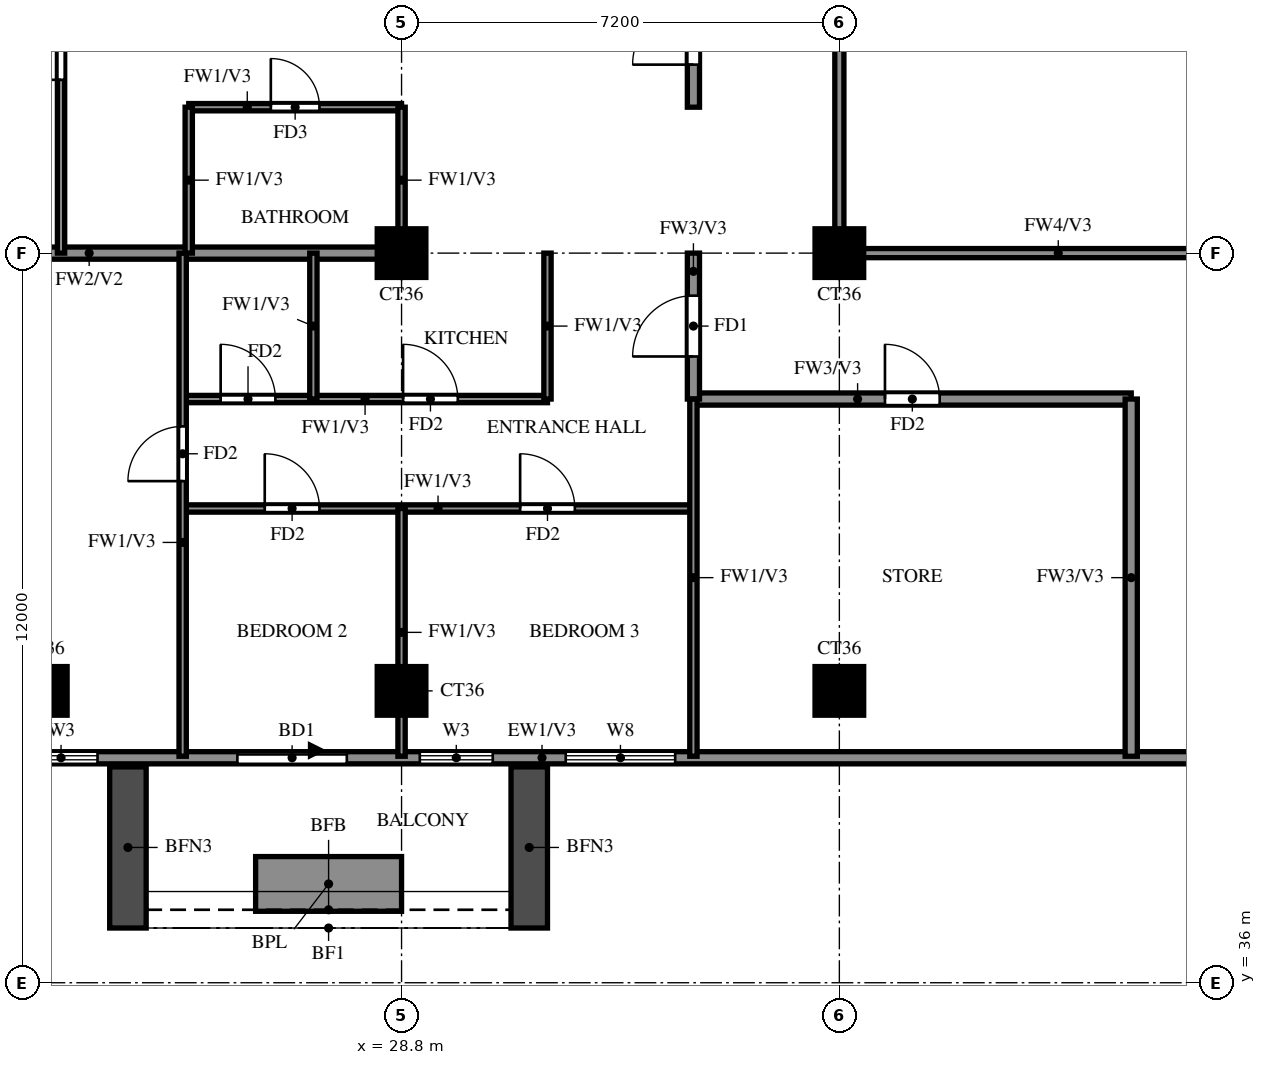
"""IFC4 building model, lengths in metres.
Left out: names, types, materials, properties, quantities, classifications, styles, units other than length and angle.
Written with IfcOpenShell. Run it as: python <this file> out.ifc"""

import sys

from ifc_helpers import new_model, si_unit, direction, frame, frame_2d, origin, origin_2d, place, context, subcontext, project, spatial, rectangle, extrude, source, transform, mapped, element, fill, save


model = new_model("IFC4")
c1 = context("Model", 3, precision=1e-05, world=origin(), true_north=direction((0.0, 1.0)))
c2 = subcontext(c1, "Body", "Model", "MODEL_VIEW")
j1 = project(units=[si_unit("LENGTHUNIT", "METRE"), si_unit("PLANEANGLEUNIT", "RADIAN")], contexts=[c1])
p1 = place(None, origin())
s1 = spatial("IfcSite", under=j1, at=p1, CompositionType="ELEMENT")
p2 = place(p1, origin())
s2 = spatial("IfcBuilding", under=s1, at=p2, CompositionType="ELEMENT")
p3 = place(p2, frame((0.0, 0.0, 236.0)))
s3 = spatial("IfcBuildingStorey", under=s2, at=p3, CompositionType="ELEMENT", Elevation=236.0)
m1 = source(origin(), c2, "Body", "SweptSolid", [
    extrude(rectangle(XDim=0.8, YDim=0.8, at=origin_2d()), origin(), (0.0, 0.0, 1.0), 3.22),
])
for number, where, z_axis, x_axis in (
    (1, (22.9, 40.8, 0.0), (0.0, 0.0, 1.0), (1.0, 0.0, 0.0)),
    (2, (28.8, 40.8, 0.0), (0.0, 0.0, 1.0), (1.0, 0.0, 0.0)),
    (3, (36.0, 40.8, 0.0), (0.0, 0.0, 1.0), (1.0, 0.0, 0.0)),
    (4, (28.8, 48.0, 0.0), (0.0, 0.0, 1.0), (1.0, 0.0, 0.0)),
    (5, (36.0, 48.0, 0.0), (0.0, 0.0, 1.0), (1.0, 0.0, 0.0)),
):
    element("IfcColumn", number, at=place(p3, frame(where, z_axis=z_axis, x_axis=x_axis)), inside=s3, PredefinedType="COLUMN", context=c2, shape_type="MappedRepresentation", body=[
        mapped(m1, transform((0.0, 0.0, 0.0))),
    ])
p4 = place(p3, frame((22.2, 39.7, 0.0), z_axis=(0.0, 0.0, 1.0), x_axis=(1.0, 0.0, 0.0)))
e6 = element("IfcWall", 6, at=p4, inside=s3, PredefinedType="SOLIDWALL", context=c2, shape_type="SweptSolid", body=[
    extrude(rectangle(XDim=19.8, YDim=0.2, at=frame_2d((9.9, 0.0))), origin(), (0.0, 0.0, 1.0), 3.22),
])
p5 = place(p4, frame((3.9, 0.0, 0.0)))
e7 = element("IfcOpeningElement", 7, at=p5, cuts=e6, PredefinedType="OPENING", context=c2, shape_type="SweptSolid", body=[
    extrude(rectangle(XDim=1.8, YDim=2.4, at=frame_2d((0.9, 1.2))), frame((0.0, 0.11, 0.0), z_axis=(0.0, -1.0, 0.0), x_axis=(1.0, 0.0, 0.0)), (0.0, 0.0, 1.0), 0.22),
])
p6 = place(p4, frame((0.4, 0.0, 0.6)))
e8 = element("IfcOpeningElement", 8, at=p6, cuts=e6, PredefinedType="OPENING", context=c2, shape_type="SweptSolid", body=[
    extrude(rectangle(XDim=1.2, YDim=2.4, at=frame_2d((0.6, 1.2))), frame((0.0, 0.11, 0.0), z_axis=(0.0, -1.0, 0.0), x_axis=(1.0, 0.0, 0.0)), (0.0, 0.0, 1.0), 0.22),
])
p7 = place(p4, frame((6.9, 0.0, 0.6)))
e9 = element("IfcOpeningElement", 9, at=p7, cuts=e6, PredefinedType="OPENING", context=c2, shape_type="SweptSolid", body=[
    extrude(rectangle(XDim=1.2, YDim=2.4, at=frame_2d((0.6, 1.2))), frame((0.0, 0.11, 0.0), z_axis=(0.0, -1.0, 0.0), x_axis=(1.0, 0.0, 0.0)), (0.0, 0.0, 1.0), 0.22),
])
p8 = place(p4, frame((9.3, 0.0, 0.6)))
e10 = element("IfcOpeningElement", 10, at=p8, cuts=e6, PredefinedType="OPENING", context=c2, shape_type="SweptSolid", body=[
    extrude(rectangle(XDim=1.8, YDim=2.4, at=frame_2d((0.9, 1.2))), frame((0.0, 0.11, 0.0), z_axis=(0.0, -1.0, 0.0), x_axis=(1.0, 0.0, 0.0)), (0.0, 0.0, 1.0), 0.22),
])
for number, where, z_axis, x_axis in (
    (11, (24.3, 39.55, 0.0), (0.0, 0.0, 1.0), (0.0, -1.0, 0.0)),
    (12, (30.9, 39.55, 0.0), (0.0, 0.0, 1.0), (0.0, -1.0, 0.0)),
):
    element("IfcWall", number, at=place(p3, frame(where, z_axis=z_axis, x_axis=x_axis)), inside=s3, PredefinedType="SOLIDWALL", context=c2, shape_type="SweptSolid", body=[
        extrude(rectangle(XDim=2.65, YDim=0.6, at=frame_2d((1.325, 0.0))), origin(), (0.0, 0.0, 1.0), 2.85),
    ])
p9 = place(p3, frame((26.4, 37.625, 0.0), z_axis=(0.0, 0.0, 1.0), x_axis=(1.0, 0.0, 0.0)))
e13 = element("IfcWall", 13, at=p9, inside=s3, PredefinedType="SOLIDWALL", context=c2, shape_type="SweptSolid", body=[
    extrude(rectangle(XDim=2.4, YDim=0.9, at=frame_2d((1.2, 0.0))), origin(), (0.0, 0.0, 1.0), 0.9),
])
p10 = place(p3, frame((33.6, 45.6, 0.0), z_axis=(0.0, 0.0, 1.0), x_axis=(1.0, 0.0, 0.0)))
e14 = element("IfcWall", 14, at=p10, inside=s3, PredefinedType="SOLIDWALL", context=c2, shape_type="SweptSolid", body=[
    extrude(rectangle(XDim=7.2, YDim=0.2, at=frame_2d((3.6, 0.0))), origin(), (0.0, 0.0, 1.0), 3.22),
])
p11 = place(p10, frame((3.15, 0.0, 0.0)))
e15 = element("IfcOpeningElement", 15, at=p11, cuts=e14, PredefinedType="OPENING", context=c2, shape_type="SweptSolid", body=[
    extrude(rectangle(XDim=0.9, YDim=2.1, at=frame_2d((0.45, 1.05))), frame((0.0, 0.11, 0.0), z_axis=(0.0, -1.0, 0.0), x_axis=(1.0, 0.0, 0.0)), (0.0, 0.0, 1.0), 0.22),
])
p12 = place(p3, frame((33.6, 45.6, 0.0), z_axis=(0.0, 0.0, 1.0), x_axis=(0.0, 1.0, 0.0)))
e16 = element("IfcWall", 16, at=p12, inside=s3, PredefinedType="SOLIDWALL", context=c2, shape_type="SweptSolid", body=[
    extrude(rectangle(XDim=2.4, YDim=0.2, at=frame_2d((1.2, 0.0))), origin(), (0.0, 0.0, 1.0), 3.22),
])
p13 = place(p12, frame((0.7, 0.0, 0.0)))
e17 = element("IfcOpeningElement", 17, at=p13, cuts=e16, PredefinedType="OPENING", context=c2, shape_type="SweptSolid", body=[
    extrude(rectangle(XDim=1.0, YDim=2.1, at=frame_2d((0.5, 1.05))), frame((0.0, 0.11, 0.0), z_axis=(0.0, -1.0, 0.0), x_axis=(1.0, 0.0, 0.0)), (0.0, 0.0, 1.0), 0.22),
])
p14 = place(p3, frame((33.6, 50.4, 0.0), z_axis=(0.0, 0.0, 1.0), x_axis=(0.0, 1.0, 0.0)))
e18 = element("IfcWall", 18, at=p14, inside=s3, PredefinedType="SOLIDWALL", context=c2, shape_type="SweptSolid", body=[
    extrude(rectangle(XDim=12.0, YDim=0.2, at=frame_2d((6.0, 0.0))), origin(), (0.0, 0.0, 1.0), 3.22),
])
p15 = place(p14, frame((0.7, 0.0, 0.0)))
e19 = element("IfcOpeningElement", 19, at=p15, cuts=e18, PredefinedType="OPENING", context=c2, shape_type="SweptSolid", body=[
    extrude(rectangle(XDim=1.0, YDim=2.1, at=frame_2d((0.5, 1.05))), frame((0.0, 0.11, 0.0), z_axis=(0.0, -1.0, 0.0), x_axis=(1.0, 0.0, 0.0)), (0.0, 0.0, 1.0), 0.22),
])
p16 = place(p14, frame((9.7, 0.0, 0.0)))
e20 = element("IfcOpeningElement", 20, at=p16, cuts=e18, PredefinedType="OPENING", context=c2, shape_type="SweptSolid", body=[
    extrude(rectangle(XDim=1.0, YDim=2.1, at=frame_2d((0.5, 1.05))), frame((0.0, 0.11, 0.0), z_axis=(0.0, -1.0, 0.0), x_axis=(1.0, 0.0, 0.0)), (0.0, 0.0, 1.0), 0.22),
])
p17 = place(p3, frame((40.8, 39.725, 0.0), z_axis=(0.0, 0.0, 1.0), x_axis=(0.0, 1.0, 0.0)))
e21 = element("IfcWall", 21, at=p17, inside=s3, PredefinedType="SOLIDWALL", context=c2, shape_type="SweptSolid", body=[
    extrude(rectangle(XDim=5.875, YDim=0.2, at=frame_2d((2.938, 0.0))), origin(), (0.0, 0.0, 1.0), 3.22),
])
p18 = place(p3, frame((18.525, 48.0, 0.0), z_axis=(0.0, 0.0, 1.0), x_axis=(1.0, 0.0, 0.0)))
e22 = element("IfcWall", 22, at=p18, inside=s3, PredefinedType="SOLIDWALL", context=c2, shape_type="SweptSolid", body=[
    extrude(rectangle(XDim=10.275, YDim=0.2, at=frame_2d((5.138, 0.0))), origin(), (0.0, 0.0, 1.0), 3.22),
])
p19 = place(p3, frame((25.2, 43.8, 0.0), z_axis=(0.0, 0.0, 1.0), x_axis=(1.0, 0.0, 0.0)))
e23 = element("IfcWall", 23, at=p19, inside=s3, PredefinedType="PARTITIONING", context=c2, shape_type="SweptSolid", body=[
    extrude(rectangle(XDim=8.4, YDim=0.12, at=frame_2d((4.2, 0.0))), origin(), (0.0, 0.0, 1.0), 3.22),
])
p20 = place(p19, frame((1.35, 0.0, 0.0)))
e24 = element("IfcOpeningElement", 24, at=p20, cuts=e23, PredefinedType="OPENING", context=c2, shape_type="SweptSolid", body=[
    extrude(rectangle(XDim=0.9, YDim=2.1, at=frame_2d((0.45, 1.05))), frame((0.0, 0.07, 0.0), z_axis=(0.0, -1.0, 0.0), x_axis=(1.0, 0.0, 0.0)), (0.0, 0.0, 1.0), 0.14),
])
p21 = place(p19, frame((5.55, 0.0, 0.0)))
e25 = element("IfcOpeningElement", 25, at=p21, cuts=e23, PredefinedType="OPENING", context=c2, shape_type="SweptSolid", body=[
    extrude(rectangle(XDim=0.9, YDim=2.1, at=frame_2d((0.45, 1.05))), frame((0.0, 0.07, 0.0), z_axis=(0.0, -1.0, 0.0), x_axis=(1.0, 0.0, 0.0)), (0.0, 0.0, 1.0), 0.14),
])
p22 = place(p3, frame((25.2, 45.6, 0.0), z_axis=(0.0, 0.0, 1.0), x_axis=(1.0, 0.0, 0.0)))
e26 = element("IfcWall", 26, at=p22, inside=s3, PredefinedType="PARTITIONING", context=c2, shape_type="SweptSolid", body=[
    extrude(rectangle(XDim=6.0, YDim=0.12, at=frame_2d((3.0, 0.0))), origin(), (0.0, 0.0, 1.0), 3.22),
])
p23 = place(p22, frame((0.625, 0.0, 0.0)))
e27 = element("IfcOpeningElement", 27, at=p23, cuts=e26, PredefinedType="OPENING", context=c2, shape_type="SweptSolid", body=[
    extrude(rectangle(XDim=0.9, YDim=2.1, at=frame_2d((0.45, 1.05))), frame((0.0, 0.07, 0.0), z_axis=(0.0, -1.0, 0.0), x_axis=(1.0, 0.0, 0.0)), (0.0, 0.0, 1.0), 0.14),
])
p24 = place(p22, frame((3.625, 0.0, 0.0)))
e28 = element("IfcOpeningElement", 28, at=p24, cuts=e26, PredefinedType="OPENING", context=c2, shape_type="SweptSolid", body=[
    extrude(rectangle(XDim=0.9, YDim=2.1, at=frame_2d((0.45, 1.05))), frame((0.0, 0.07, 0.0), z_axis=(0.0, -1.0, 0.0), x_axis=(1.0, 0.0, 0.0)), (0.0, 0.0, 1.0), 0.14),
])
p25 = place(p3, frame((25.3, 50.4, 0.0), z_axis=(0.0, 0.0, 1.0), x_axis=(1.0, 0.0, 0.0)))
e29 = element("IfcWall", 29, at=p25, inside=s3, PredefinedType="PARTITIONING", context=c2, shape_type="SweptSolid", body=[
    extrude(rectangle(XDim=3.5, YDim=0.12, at=frame_2d((1.75, 0.0))), origin(), (0.0, 0.0, 1.0), 3.22),
])
p26 = place(p25, frame((1.35, 0.0, 0.0)))
e30 = element("IfcOpeningElement", 30, at=p26, cuts=e29, PredefinedType="OPENING", context=c2, shape_type="SweptSolid", body=[
    extrude(rectangle(XDim=0.8, YDim=2.1, at=frame_2d((0.4, 1.05))), frame((0.0, 0.07, 0.0), z_axis=(0.0, -1.0, 0.0), x_axis=(1.0, 0.0, 0.0)), (0.0, 0.0, 1.0), 0.14),
])
p27 = place(p3, frame((23.2, 48.0, 0.0), z_axis=(0.0, 0.0, 1.0), x_axis=(0.0, 1.0, 0.0)))
e31 = element("IfcWall", 31, at=p27, inside=s3, PredefinedType="PARTITIONING", context=c2, shape_type="SweptSolid", body=[
    extrude(rectangle(XDim=25.2, YDim=0.12, at=frame_2d((12.6, 0.0))), origin(), (0.0, 0.0, 1.0), 3.22),
])
p28 = place(p27, frame((2.85, 0.0, 0.0)))
e32 = element("IfcOpeningElement", 32, at=p28, cuts=e31, PredefinedType="OPENING", context=c2, shape_type="SweptSolid", body=[
    extrude(rectangle(XDim=1.5, YDim=2.1, at=frame_2d((0.75, 1.05))), frame((0.0, 0.07, 0.0), z_axis=(0.0, -1.0, 0.0), x_axis=(1.0, 0.0, 0.0)), (0.0, 0.0, 1.0), 0.14),
])
p29 = place(p27, frame((8.55, 0.0, 0.0)))
e33 = element("IfcOpeningElement", 33, at=p29, cuts=e31, PredefinedType="OPENING", context=c2, shape_type="SweptSolid", body=[
    extrude(rectangle(XDim=0.9, YDim=2.1, at=frame_2d((0.45, 1.05))), frame((0.0, 0.07, 0.0), z_axis=(0.0, -1.0, 0.0), x_axis=(1.0, 0.0, 0.0)), (0.0, 0.0, 1.0), 0.14),
])
p30 = place(p27, frame((12.15, 0.0, 0.0)))
e34 = element("IfcOpeningElement", 34, at=p30, cuts=e31, PredefinedType="OPENING", context=c2, shape_type="SweptSolid", body=[
    extrude(rectangle(XDim=0.9, YDim=2.1, at=frame_2d((0.45, 1.05))), frame((0.0, 0.07, 0.0), z_axis=(0.0, -1.0, 0.0), x_axis=(1.0, 0.0, 0.0)), (0.0, 0.0, 1.0), 0.14),
])
p31 = place(p27, frame((15.75, 0.0, 0.0)))
e35 = element("IfcOpeningElement", 35, at=p31, cuts=e31, PredefinedType="OPENING", context=c2, shape_type="SweptSolid", body=[
    extrude(rectangle(XDim=0.9, YDim=2.1, at=frame_2d((0.45, 1.05))), frame((0.0, 0.07, 0.0), z_axis=(0.0, -1.0, 0.0), x_axis=(1.0, 0.0, 0.0)), (0.0, 0.0, 1.0), 0.14),
])
p32 = place(p27, frame((19.35, 0.0, 0.0)))
e36 = element("IfcOpeningElement", 36, at=p32, cuts=e31, PredefinedType="OPENING", context=c2, shape_type="SweptSolid", body=[
    extrude(rectangle(XDim=0.9, YDim=2.1, at=frame_2d((0.45, 1.05))), frame((0.0, 0.07, 0.0), z_axis=(0.0, -1.0, 0.0), x_axis=(1.0, 0.0, 0.0)), (0.0, 0.0, 1.0), 0.14),
])
p33 = place(p27, frame((22.95, 0.0, 0.0)))
e37 = element("IfcOpeningElement", 37, at=p33, cuts=e31, PredefinedType="OPENING", context=c2, shape_type="SweptSolid", body=[
    extrude(rectangle(XDim=0.9, YDim=2.1, at=frame_2d((0.45, 1.05))), frame((0.0, 0.07, 0.0), z_axis=(0.0, -1.0, 0.0), x_axis=(1.0, 0.0, 0.0)), (0.0, 0.0, 1.0), 0.14),
])
p34 = place(p3, frame((25.2, 39.725, 0.0), z_axis=(0.0, 0.0, 1.0), x_axis=(0.0, 1.0, 0.0)))
e38 = element("IfcWall", 38, at=p34, inside=s3, PredefinedType="PARTITIONING", context=c2, shape_type="SweptSolid", body=[
    extrude(rectangle(XDim=8.275, YDim=0.12, at=frame_2d((4.137, 0.0))), origin(), (0.0, 0.0, 1.0), 3.22),
])
p35 = place(p34, frame((4.525, 0.0, 0.0)))
e39 = element("IfcOpeningElement", 39, at=p35, cuts=e38, PredefinedType="OPENING", context=c2, shape_type="SweptSolid", body=[
    extrude(rectangle(XDim=0.9, YDim=2.1, at=frame_2d((0.45, 1.05))), frame((0.0, 0.07, 0.0), z_axis=(0.0, -1.0, 0.0), x_axis=(1.0, 0.0, 0.0)), (0.0, 0.0, 1.0), 0.14),
])
for number, where, z_axis, x_axis in (
    (40, (25.3, 48.0, 0.0), (0.0, 0.0, 1.0), (0.0, 1.0, 0.0)),
    (41, (27.35, 45.6, 0.0), (0.0, 0.0, 1.0), (0.0, 1.0, 0.0)),
):
    element("IfcWall", number, at=place(p3, frame(where, z_axis=z_axis, x_axis=x_axis)), inside=s3, PredefinedType="PARTITIONING", context=c2, shape_type="SweptSolid", body=[
        extrude(rectangle(XDim=2.4, YDim=0.12, at=frame_2d((1.2, 0.0))), origin(), (0.0, 0.0, 1.0), 3.22),
    ])
p36 = place(p3, frame((28.8, 39.725, 0.0), z_axis=(0.0, 0.0, 1.0), x_axis=(0.0, 1.0, 0.0)))
e42 = element("IfcWall", 42, at=p36, inside=s3, PredefinedType="PARTITIONING", context=c2, shape_type="SweptSolid", body=[
    extrude(rectangle(XDim=4.075, YDim=0.12, at=frame_2d((2.038, 0.0))), origin(), (0.0, 0.0, 1.0), 3.22),
])
for number, where, z_axis, x_axis in (
    (43, (28.8, 48.0, 0.0), (0.0, 0.0, 1.0), (0.0, 1.0, 0.0)),
    (44, (31.2, 45.6, 0.0), (0.0, 0.0, 1.0), (0.0, 1.0, 0.0)),
):
    element("IfcWall", number, at=place(p3, frame(where, z_axis=z_axis, x_axis=x_axis)), inside=s3, PredefinedType="PARTITIONING", context=c2, shape_type="SweptSolid", body=[
        extrude(rectangle(XDim=2.4, YDim=0.12, at=frame_2d((1.2, 0.0))), origin(), (0.0, 0.0, 1.0), 3.22),
    ])
p37 = place(p3, frame((33.6, 39.725, 0.0), z_axis=(0.0, 0.0, 1.0), x_axis=(0.0, 1.0, 0.0)))
e45 = element("IfcWall", 45, at=p37, inside=s3, PredefinedType="PARTITIONING", context=c2, shape_type="SweptSolid", body=[
    extrude(rectangle(XDim=5.875, YDim=0.12, at=frame_2d((2.938, 0.0))), origin(), (0.0, 0.0, 1.0), 3.22),
])
p38 = place(p3, frame((36.0, 48.0, 0.0), z_axis=(0.0, 0.0, 1.0), x_axis=(1.0, 0.0, 0.0)))
e46 = element("IfcWall", 46, at=p38, inside=s3, PredefinedType="SOLIDWALL", context=c2, shape_type="SweptSolid", body=[
    extrude(rectangle(XDim=7.2, YDim=0.15, at=frame_2d((3.6, 0.0))), origin(), (0.0, 0.0, 1.0), 2.32),
])
p39 = place(p3, frame((36.0, 48.0, 0.0), z_axis=(0.0, 0.0, 1.0), x_axis=(0.0, 1.0, 0.0)))
e47 = element("IfcWall", 47, at=p39, inside=s3, PredefinedType="SOLIDWALL", context=c2, shape_type="SweptSolid", body=[
    extrude(rectangle(XDim=14.4, YDim=0.15, at=frame_2d((7.2, 0.0))), origin(), (0.0, 0.0, 1.0), 2.32),
])
p40 = place(p5, origin())
e48 = element("IfcDoor", 48, at=p40, inside=s3, OperationType="DOUBLE_DOOR_SLIDING", PredefinedType="DOOR", context=c2, shape_type="SweptSolid", body=[
    extrude(rectangle(XDim=1.8, YDim=2.4, at=frame_2d((0.9, 1.2))), frame((0.0, 0.025, 0.0), z_axis=(0.0, -1.0, 0.0), x_axis=(1.0, 0.0, 0.0)), (0.0, 0.0, 1.0), 0.05),
])
fill(e7, e48)
p41 = place(p6, origin())
e49 = element("IfcWindow", 49, at=p41, inside=s3, PartitioningType="SINGLE_PANEL", PredefinedType="WINDOW", context=c2, shape_type="SweptSolid", body=[
    extrude(rectangle(XDim=1.2, YDim=2.4, at=frame_2d((0.6, 1.2))), frame((0.0, 0.03, 0.0), z_axis=(0.0, -1.0, 0.0), x_axis=(1.0, 0.0, 0.0)), (0.0, 0.0, 1.0), 0.06),
])
fill(e8, e49)
p42 = place(p7, origin())
e50 = element("IfcWindow", 50, at=p42, inside=s3, PartitioningType="SINGLE_PANEL", PredefinedType="WINDOW", context=c2, shape_type="SweptSolid", body=[
    extrude(rectangle(XDim=1.2, YDim=2.4, at=frame_2d((0.6, 1.2))), frame((0.0, 0.03, 0.0), z_axis=(0.0, -1.0, 0.0), x_axis=(1.0, 0.0, 0.0)), (0.0, 0.0, 1.0), 0.06),
])
fill(e9, e50)
p43 = place(p8, origin())
e51 = element("IfcWindow", 51, at=p43, inside=s3, PartitioningType="DOUBLE_PANEL_VERTICAL", PredefinedType="WINDOW", context=c2, shape_type="SweptSolid", body=[
    extrude(rectangle(XDim=1.8, YDim=2.4, at=frame_2d((0.9, 1.2))), frame((0.0, 0.03, 0.0), z_axis=(0.0, -1.0, 0.0), x_axis=(1.0, 0.0, 0.0)), (0.0, 0.0, 1.0), 0.06),
])
fill(e10, e51)
p44 = place(p13, origin())
e52 = element("IfcDoor", 52, at=p44, inside=s3, OperationType="SINGLE_SWING_RIGHT", PredefinedType="DOOR", context=c2, shape_type="SweptSolid", body=[
    extrude(rectangle(XDim=1.0, YDim=2.1, at=frame_2d((0.5, 1.05))), frame((0.0, 0.025, 0.0), z_axis=(0.0, -1.0, 0.0), x_axis=(1.0, 0.0, 0.0)), (0.0, 0.0, 1.0), 0.05),
])
fill(e17, e52)
p45 = place(p35, origin())
e53 = element("IfcDoor", 53, at=p45, inside=s3, OperationType="SINGLE_SWING_LEFT", PredefinedType="DOOR", context=c2, shape_type="SweptSolid", body=[
    extrude(rectangle(XDim=0.9, YDim=2.1, at=frame_2d((0.45, 1.05))), frame((0.0, 0.025, 0.0), z_axis=(0.0, -1.0, 0.0), x_axis=(1.0, 0.0, 0.0)), (0.0, 0.0, 1.0), 0.05),
])
fill(e39, e53)
p46 = place(p20, origin())
e54 = element("IfcDoor", 54, at=p46, inside=s3, OperationType="SINGLE_SWING_LEFT", PredefinedType="DOOR", context=c2, shape_type="SweptSolid", body=[
    extrude(rectangle(XDim=0.9, YDim=2.1, at=frame_2d((0.45, 1.05))), frame((0.0, 0.025, 0.0), z_axis=(0.0, -1.0, 0.0), x_axis=(1.0, 0.0, 0.0)), (0.0, 0.0, 1.0), 0.05),
])
fill(e24, e54)
p47 = place(p21, origin())
e55 = element("IfcDoor", 55, at=p47, inside=s3, OperationType="SINGLE_SWING_RIGHT", PredefinedType="DOOR", context=c2, shape_type="SweptSolid", body=[
    extrude(rectangle(XDim=0.9, YDim=2.1, at=frame_2d((0.45, 1.05))), frame((0.0, 0.025, 0.0), z_axis=(0.0, -1.0, 0.0), x_axis=(1.0, 0.0, 0.0)), (0.0, 0.0, 1.0), 0.05),
])
fill(e25, e55)
p48 = place(p23, origin())
e56 = element("IfcDoor", 56, at=p48, inside=s3, OperationType="SINGLE_SWING_LEFT", PredefinedType="DOOR", context=c2, shape_type="SweptSolid", body=[
    extrude(rectangle(XDim=0.9, YDim=2.1, at=frame_2d((0.45, 1.05))), frame((0.0, 0.025, 0.0), z_axis=(0.0, -1.0, 0.0), x_axis=(1.0, 0.0, 0.0)), (0.0, 0.0, 1.0), 0.05),
])
fill(e27, e56)
p49 = place(p24, origin())
e57 = element("IfcDoor", 57, at=p49, inside=s3, OperationType="SINGLE_SWING_LEFT", PredefinedType="DOOR", context=c2, shape_type="SweptSolid", body=[
    extrude(rectangle(XDim=0.9, YDim=2.1, at=frame_2d((0.45, 1.05))), frame((0.0, 0.025, 0.0), z_axis=(0.0, -1.0, 0.0), x_axis=(1.0, 0.0, 0.0)), (0.0, 0.0, 1.0), 0.05),
])
fill(e28, e57)
p50 = place(p11, origin())
e58 = element("IfcDoor", 58, at=p50, inside=s3, OperationType="SINGLE_SWING_RIGHT", PredefinedType="DOOR", context=c2, shape_type="SweptSolid", body=[
    extrude(rectangle(XDim=0.9, YDim=2.1, at=frame_2d((0.45, 1.05))), frame((0.0, 0.025, 0.0), z_axis=(0.0, -1.0, 0.0), x_axis=(1.0, 0.0, 0.0)), (0.0, 0.0, 1.0), 0.05),
])
fill(e15, e58)
p51 = place(p15, origin())
e59 = element("IfcDoor", 59, at=p51, inside=s3, OperationType="SINGLE_SWING_LEFT", PredefinedType="DOOR", context=c2, shape_type="SweptSolid", body=[
    extrude(rectangle(XDim=1.0, YDim=2.1, at=frame_2d((0.5, 1.05))), frame((0.0, 0.025, 0.0), z_axis=(0.0, -1.0, 0.0), x_axis=(1.0, 0.0, 0.0)), (0.0, 0.0, 1.0), 0.05),
])
fill(e19, e59)
p52 = place(p28, origin())
e60 = element("IfcDoor", 60, at=p52, inside=s3, OperationType="SINGLE_SWING_LEFT", PredefinedType="DOOR", context=c2, shape_type="SweptSolid", body=[
    extrude(rectangle(XDim=1.5, YDim=2.1, at=frame_2d((0.75, 1.05))), frame((0.0, 0.025, 0.0), z_axis=(0.0, -1.0, 0.0), x_axis=(1.0, 0.0, 0.0)), (0.0, 0.0, 1.0), 0.05),
])
fill(e32, e60)
p53 = place(p26, origin())
e61 = element("IfcDoor", 61, at=p53, inside=s3, OperationType="SINGLE_SWING_LEFT", PredefinedType="DOOR", context=c2, shape_type="SweptSolid", body=[
    extrude(rectangle(XDim=0.8, YDim=2.1, at=frame_2d((0.4, 1.05))), frame((0.0, 0.025, 0.0), z_axis=(0.0, -1.0, 0.0), x_axis=(1.0, 0.0, 0.0)), (0.0, 0.0, 1.0), 0.05),
])
fill(e30, e61)
save(model, sys.argv[1])
